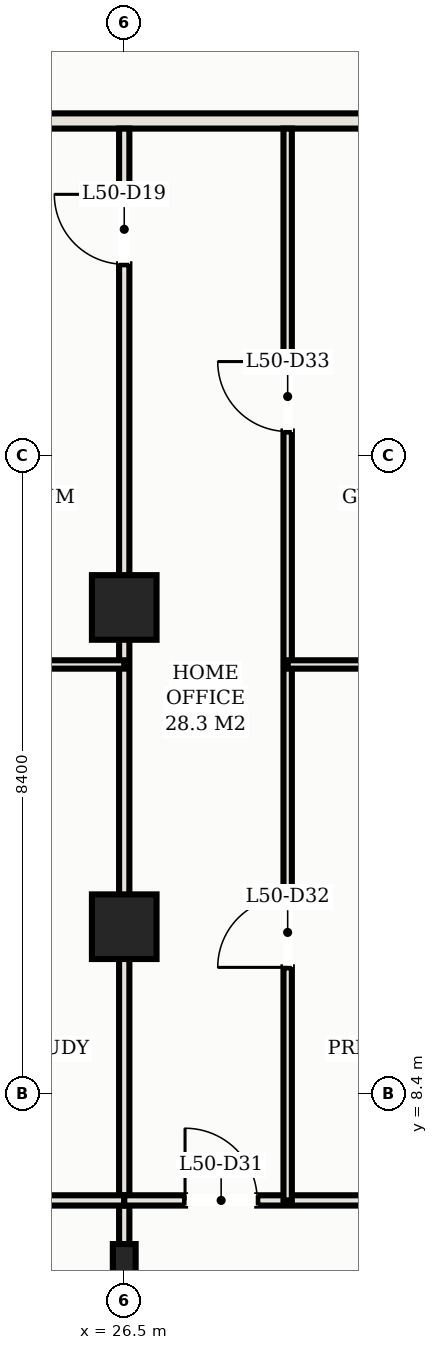
"""IFC4 building model, lengths in metres.
Left out: names, types, materials, properties, quantities, classifications, styles, units other than length and angle.
Written with IfcOpenShell. Run it as: python <this file> out.ifc"""

import sys

from ifc_helpers import new_model, si_unit, direction, frame, frame_2d, origin, origin_2d, place, context, subcontext, project, spatial, rectangle, hollow_rectangle, extrude, element, fill, save


model = new_model("IFC4")
c1 = context("Model", 3, precision=1e-05, world=origin(), true_north=direction((0.0, 1.0)))
c2 = subcontext(c1, "Body", "Model", "MODEL_VIEW")
j1 = project(units=[si_unit("LENGTHUNIT", "METRE"), si_unit("PLANEANGLEUNIT", "RADIAN")], contexts=[c1])
p1 = place(None, origin())
s1 = spatial("IfcSite", under=j1, at=p1, CompositionType="ELEMENT")
p2 = place(p1, origin())
s2 = spatial("IfcBuilding", under=s1, at=p2, CompositionType="ELEMENT")
p3 = place(p2, frame((0.0, 0.0, 182.1)))
s3 = spatial("IfcBuildingStorey", under=s2, at=p3, CompositionType="ELEMENT", Elevation=182.1)
for number, where, z_axis, x_axis in (
    (1, (26.5, 14.8, 0.0), (0.0, 0.0, 1.0), (1.0, 0.0, 0.0)),
    (2, (26.5, 10.6, 0.0), (0.0, 0.0, 1.0), (1.0, 0.0, 0.0)),
):
    element("IfcColumn", number, at=place(p3, frame(where, z_axis=z_axis, x_axis=x_axis)), inside=s3, PredefinedType="COLUMN", context=c2, shape_type="SweptSolid", body=[
        extrude(hollow_rectangle(XDim=0.85, YDim=0.85, WallThickness=0.028, at=origin_2d()), origin(), (0.0, 0.0, 1.0), 3.3),
    ])
p4 = place(p3, frame((26.5, 6.2, 0.0), z_axis=(0.0, 0.0, 1.0), x_axis=(1.0, 0.0, 0.0)))
e3 = element("IfcColumn", 3, at=p4, inside=s3, PredefinedType="COLUMN", context=c2, shape_type="SweptSolid", body=[
    extrude(hollow_rectangle(XDim=0.3, YDim=0.45, WallThickness=0.016, at=origin_2d()), origin(), (0.0, 0.0, 1.0), 3.3),
])
p5 = place(p3, frame((4.32, 21.2, 0.0), z_axis=(0.0, 0.0, 1.0), x_axis=(1.0, 0.0, 0.0)))
e4 = element("IfcWall", 4, at=p5, inside=s3, PredefinedType="PARTITIONING", context=c2, shape_type="SweptSolid", body=[
    extrude(rectangle(XDim=44.36, YDim=0.2, at=frame_2d((22.18, 0.0))), origin(), (0.0, 0.0, 1.0), 2.57),
])
p6 = place(p5, frame((7.03, 0.0, 0.0)))
e5 = element("IfcOpeningElement", 5, at=p6, cuts=e4, PredefinedType="OPENING", context=c2, shape_type="SweptSolid", body=[
    extrude(rectangle(XDim=1.1, YDim=2.25, at=frame_2d((0.55, 1.125))), frame((0.0, 0.11, 0.0), z_axis=(0.0, -1.0, 0.0), x_axis=(1.0, 0.0, 0.0)), (0.0, 0.0, 1.0), 0.22),
])
p7 = place(p5, frame((28.23, 0.0, 0.0)))
e6 = element("IfcOpeningElement", 6, at=p7, cuts=e4, PredefinedType="OPENING", context=c2, shape_type="SweptSolid", body=[
    extrude(rectangle(XDim=1.1, YDim=2.25, at=frame_2d((0.55, 1.125))), frame((0.0, 0.11, 0.0), z_axis=(0.0, -1.0, 0.0), x_axis=(1.0, 0.0, 0.0)), (0.0, 0.0, 1.0), 0.22),
])
p8 = place(p5, frame((2.635, 0.0, 0.0)))
e7 = element("IfcOpeningElement", 7, at=p8, cuts=e4, PredefinedType="OPENING", context=c2, shape_type="SweptSolid", body=[
    extrude(rectangle(XDim=0.92, YDim=2.15, at=frame_2d((0.46, 1.075))), frame((0.0, 0.11, 0.0), z_axis=(0.0, -1.0, 0.0), x_axis=(1.0, 0.0, 0.0)), (0.0, 0.0, 1.0), 0.22),
])
p9 = place(p5, frame((40.805, 0.0, 0.0)))
e8 = element("IfcOpeningElement", 8, at=p9, cuts=e4, PredefinedType="OPENING", context=c2, shape_type="SweptSolid", body=[
    extrude(rectangle(XDim=0.92, YDim=2.15, at=frame_2d((0.46, 1.075))), frame((0.0, 0.11, 0.0), z_axis=(0.0, -1.0, 0.0), x_axis=(1.0, 0.0, 0.0)), (0.0, 0.0, 1.0), 0.22),
])
p10 = place(p3, frame((26.5, 1.82, 0.0), z_axis=(0.0, 0.0, 1.0), x_axis=(0.0, 1.0, 0.0)))
e9 = element("IfcWall", 9, at=p10, inside=s3, PredefinedType="PARTITIONING", context=c2, shape_type="SweptSolid", body=[
    extrude(rectangle(XDim=19.28, YDim=0.135, at=frame_2d((9.64, 0.0))), origin(), (0.0, 0.0, 1.0), 2.325),
])
p11 = place(p10, frame((17.495, 0.0, 0.0)))
e10 = element("IfcOpeningElement", 10, at=p11, cuts=e9, PredefinedType="OPENING", context=c2, shape_type="SweptSolid", body=[
    extrude(rectangle(XDim=0.92, YDim=2.15, at=frame_2d((0.46, 1.075))), frame((0.0, 0.078, 0.0), z_axis=(0.0, -1.0, 0.0), x_axis=(1.0, 0.0, 0.0)), (0.0, 0.0, 1.0), 0.155),
])
p12 = place(p3, frame((21.2, 6.999, 0.0), z_axis=(0.0, 0.0, 1.0), x_axis=(1.0, 0.0, 0.0)))
e11 = element("IfcWall", 11, at=p12, inside=s3, PredefinedType="PARTITIONING", context=c2, shape_type="SweptSolid", body=[
    extrude(rectangle(XDim=5.3, YDim=0.135, at=frame_2d((2.65, 0.0))), origin(), (0.0, 0.0, 1.0), 2.57),
])
p13 = place(p12, frame((0.8, 0.0, 0.0)))
e12 = element("IfcOpeningElement", 12, at=p13, cuts=e11, PredefinedType="OPENING", context=c2, shape_type="SweptSolid", body=[
    extrude(rectangle(XDim=0.95, YDim=2.15, at=frame_2d((0.475, 1.075))), frame((0.0, 0.078, 0.0), z_axis=(0.0, -1.0, 0.0), x_axis=(1.0, 0.0, 0.0)), (0.0, 0.0, 1.0), 0.155),
])
p14 = place(p3, frame((23.35, 14.05, 0.0), z_axis=(0.0, 0.0, 1.0), x_axis=(1.0, 0.0, 0.0)))
e13 = element("IfcWall", 13, at=p14, inside=s3, PredefinedType="MOVABLE", context=c2, shape_type="SweptSolid", body=[
    extrude(rectangle(XDim=3.15, YDim=0.11, at=frame_2d((1.575, 0.0))), origin(), (0.0, 0.0, 1.0), 2.57),
])
p15 = place(p3, frame((26.5, 6.999, 0.0), z_axis=(0.0, 0.0, 1.0), x_axis=(1.0, 0.0, 0.0)))
e14 = element("IfcWall", 14, at=p15, inside=s3, PredefinedType="PARTITIONING", context=c2, shape_type="SweptSolid", body=[
    extrude(rectangle(XDim=5.3, YDim=0.135, at=frame_2d((2.65, 0.0))), origin(), (0.0, 0.0, 1.0), 2.57),
])
p16 = place(p15, frame((0.8, 0.0, 0.0)))
e15 = element("IfcOpeningElement", 15, at=p16, cuts=e14, PredefinedType="OPENING", context=c2, shape_type="SweptSolid", body=[
    extrude(rectangle(XDim=0.95, YDim=2.15, at=frame_2d((0.475, 1.075))), frame((0.0, 0.078, 0.0), z_axis=(0.0, -1.0, 0.0), x_axis=(1.0, 0.0, 0.0)), (0.0, 0.0, 1.0), 0.155),
])
p17 = place(p3, frame((28.65, 6.999, 0.0), z_axis=(0.0, 0.0, 1.0), x_axis=(0.0, 1.0, 0.0)))
e16 = element("IfcWall", 16, at=p17, inside=s3, PredefinedType="MOVABLE", context=c2, shape_type="SweptSolid", body=[
    extrude(rectangle(XDim=14.101, YDim=0.11, at=frame_2d((7.051, 0.0))), origin(), (0.0, 0.0, 1.0), 2.57),
])
p18 = place(p17, frame((3.066, 0.0, 0.0)))
e17 = element("IfcOpeningElement", 17, at=p18, cuts=e16, PredefinedType="OPENING", context=c2, shape_type="SweptSolid", body=[
    extrude(rectangle(XDim=0.92, YDim=2.15, at=frame_2d((0.46, 1.075))), frame((0.0, 0.065, 0.0), z_axis=(0.0, -1.0, 0.0), x_axis=(1.0, 0.0, 0.0)), (0.0, 0.0, 1.0), 0.13),
])
p19 = place(p17, frame((10.116, 0.0, 0.0)))
e18 = element("IfcOpeningElement", 18, at=p19, cuts=e16, PredefinedType="OPENING", context=c2, shape_type="SweptSolid", body=[
    extrude(rectangle(XDim=0.92, YDim=2.15, at=frame_2d((0.46, 1.075))), frame((0.0, 0.065, 0.0), z_axis=(0.0, -1.0, 0.0), x_axis=(1.0, 0.0, 0.0)), (0.0, 0.0, 1.0), 0.13),
])
p20 = place(p3, frame((28.65, 14.05, 0.0), z_axis=(0.0, 0.0, 1.0), x_axis=(1.0, 0.0, 0.0)))
e19 = element("IfcWall", 19, at=p20, inside=s3, PredefinedType="MOVABLE", context=c2, shape_type="SweptSolid", body=[
    extrude(rectangle(XDim=3.15, YDim=0.11, at=frame_2d((1.575, 0.0))), origin(), (0.0, 0.0, 1.0), 2.57),
])
p21 = place(p11, origin())
e20 = element("IfcDoor", 20, at=p21, inside=s3, OperationType="SINGLE_SWING_RIGHT", PredefinedType="DOOR", context=c2, shape_type="SweptSolid", body=[
    extrude(rectangle(XDim=0.92, YDim=2.15, at=frame_2d((0.46, 1.075))), frame((0.0, 0.025, 0.0), z_axis=(0.0, -1.0, 0.0), x_axis=(1.0, 0.0, 0.0)), (0.0, 0.0, 1.0), 0.05),
])
fill(e10, e20)
p22 = place(p16, origin())
e21 = element("IfcDoor", 21, at=p22, inside=s3, OperationType="SINGLE_SWING_LEFT", PredefinedType="DOOR", context=c2, shape_type="SweptSolid", body=[
    extrude(rectangle(XDim=0.95, YDim=2.15, at=frame_2d((0.475, 1.075))), frame((0.0, 0.025, 0.0), z_axis=(0.0, -1.0, 0.0), x_axis=(1.0, 0.0, 0.0)), (0.0, 0.0, 1.0), 0.05),
])
fill(e15, e21)
p23 = place(p18, origin())
e22 = element("IfcDoor", 22, at=p23, inside=s3, OperationType="SINGLE_SWING_LEFT", PredefinedType="DOOR", context=c2, shape_type="SweptSolid", body=[
    extrude(rectangle(XDim=0.92, YDim=2.15, at=frame_2d((0.46, 1.075))), frame((0.0, 0.025, 0.0), z_axis=(0.0, -1.0, 0.0), x_axis=(1.0, 0.0, 0.0)), (0.0, 0.0, 1.0), 0.05),
])
fill(e17, e22)
p24 = place(p19, origin())
e23 = element("IfcDoor", 23, at=p24, inside=s3, OperationType="SINGLE_SWING_RIGHT", PredefinedType="DOOR", context=c2, shape_type="SweptSolid", body=[
    extrude(rectangle(XDim=0.92, YDim=2.15, at=frame_2d((0.46, 1.075))), frame((0.0, 0.025, 0.0), z_axis=(0.0, -1.0, 0.0), x_axis=(1.0, 0.0, 0.0)), (0.0, 0.0, 1.0), 0.05),
])
fill(e18, e23)
save(model, sys.argv[1])
